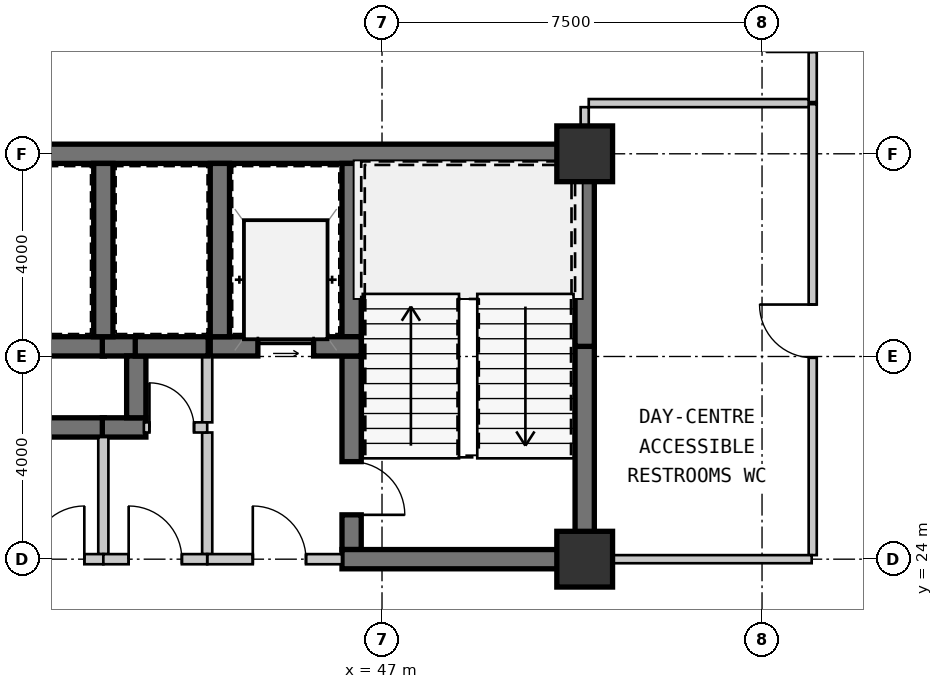
"""IFC4 building model, lengths in metres.
Left out: names, types, materials, properties, quantities, classifications, styles, units other than length and angle.
Written with IfcOpenShell. Run it as: python <this file> out.ifc"""

import sys

from ifc_helpers import new_model, si_unit, direction, frame, frame_2d, origin, origin_2d, place, context, subcontext, project, spatial, rectangle, extrude, source, transform, mapped, element, fill, save


model = new_model("IFC4")
c1 = context("Model", 3, precision=1e-05, world=origin(), true_north=direction((0.0, 1.0)))
c2 = subcontext(c1, "Body", "Model", "MODEL_VIEW")
j1 = project(units=[si_unit("LENGTHUNIT", "METRE"), si_unit("PLANEANGLEUNIT", "RADIAN")], contexts=[c1])
p1 = place(None, origin())
s1 = spatial("IfcSite", under=j1, at=p1, CompositionType="ELEMENT")
p2 = place(p1, origin())
s2 = spatial("IfcBuilding", under=s1, at=p2, CompositionType="ELEMENT")
p3 = place(p2, frame((0.0, 0.0, 12.95)))
s3 = spatial("IfcBuildingStorey", under=s2, at=p3, CompositionType="ELEMENT", Elevation=12.95)
m1 = source(origin(), c2, "Body", "SweptSolid", [
    extrude(rectangle(XDim=1.1, YDim=1.1, at=origin_2d()), origin(), (0.0, 0.0, 1.0), 3.85),
])
for number, where, z_axis, x_axis in (
    (1, (51.0, 24.0, 0.0), (0.0, 0.0, 1.0), (1.0, 0.0, 0.0)),
    (2, (51.0, 32.0, 0.0), (0.0, 0.0, 1.0), (1.0, 0.0, 0.0)),
):
    element("IfcColumn", number, at=place(p3, frame(where, z_axis=z_axis, x_axis=x_axis)), inside=s3, PredefinedType="COLUMN", context=c2, shape_type="MappedRepresentation", body=[
        mapped(m1, transform((0.0, 0.0, 0.0), scale=1.0)),
    ])
m2 = source(origin(), c2, "Body", "SweptSolid", [
    extrude(rectangle(XDim=11.99, YDim=0.38, at=frame_2d((5.995, 0.0))), origin(), (0.0, 0.0, 1.0), 3.43),
])
p4 = place(p3, frame((39.2, 32.0, 0.0), z_axis=(0.0, 0.0, 1.0), x_axis=(1.0, 0.0, 0.0)))
e3 = element("IfcWall", 3, at=p4, inside=s3, PredefinedType="SHEAR", context=c2, shape_type="MappedRepresentation", body=[
    mapped(m2, transform((0.0, 0.0, 0.0), scale=1.0)),
])
m3 = source(origin(), c2, "Body", "SweptSolid", [
    extrude(rectangle(XDim=4.01, YDim=0.38, at=frame_2d((2.005, 0.0))), origin(), (0.0, 0.0, 1.0), 3.43),
])
p5 = place(p3, frame((51.0, 24.19, 0.0), z_axis=(0.0, 0.0, 1.0), x_axis=(0.0, 1.0, 0.0)))
e4 = element("IfcWall", 4, at=p5, inside=s3, PredefinedType="SHEAR", context=c2, shape_type="MappedRepresentation", body=[
    mapped(m3, transform((0.0, 0.0, 0.0), scale=1.0)),
])
m4 = source(origin(), c2, "Body", "SweptSolid", [
    extrude(rectangle(XDim=3.61, YDim=0.38, at=frame_2d((1.805, 0.0))), origin(), (0.0, 0.0, 1.0), 3.43),
])
p6 = place(p3, frame((51.0, 28.2, 0.0), z_axis=(0.0, 0.0, 1.0), x_axis=(0.0, 1.0, 0.0)))
e5 = element("IfcWall", 5, at=p6, inside=s3, PredefinedType="SHEAR", context=c2, shape_type="MappedRepresentation", body=[
    mapped(m4, transform((0.0, 0.0, 0.0), scale=1.0)),
])
m5 = source(origin(), c2, "Body", "SweptSolid", [
    extrude(rectangle(XDim=3.42, YDim=0.38, at=frame_2d((1.71, 0.0))), origin(), (0.0, 0.0, 1.0), 3.43),
])
p7 = place(p3, frame((46.4, 31.81, 0.0), z_axis=(0.0, 0.0, 1.0), x_axis=(0.0, -1.0, 0.0)))
e6 = element("IfcWall", 6, at=p7, inside=s3, PredefinedType="SHEAR", context=c2, shape_type="MappedRepresentation", body=[
    mapped(m5, transform((0.0, 0.0, 0.0), scale=1.0)),
])
m6 = source(origin(), c2, "Body", "SweptSolid", [
    extrude(rectangle(XDim=3.82, YDim=0.38, at=frame_2d((1.91, 0.0))), origin(), (0.0, 0.0, 1.0), 3.43),
])
p8 = place(p3, frame((46.4, 28.01, 0.0), z_axis=(0.0, 0.0, 1.0), x_axis=(0.0, -1.0, 0.0)))
e7 = element("IfcWall", 7, at=p8, inside=s3, PredefinedType="SHEAR", context=c2, shape_type="MappedRepresentation", body=[
    mapped(m6, transform((0.0, 0.0, 0.0), scale=1.0)),
])
m7 = source(origin(), c2, "Body", "SweptSolid", [
    extrude(rectangle(XDim=1.05, YDim=2.1, at=frame_2d((0.525, 1.05))), frame((0.0, 0.2, 0.0), z_axis=(0.0, -1.0, 0.0), x_axis=(1.0, 0.0, 0.0)), (0.0, 0.0, 1.0), 0.4),
])
p9 = place(p8, frame((2.085, 0.0, 0.0)))
e8 = element("IfcOpeningElement", 8, at=p9, cuts=e7, PredefinedType="OPENING", context=c2, shape_type="MappedRepresentation", body=[
    mapped(m7, transform((0.0, 0.0, 0.0), scale=1.0)),
])
m8 = source(origin(), c2, "Body", "SweptSolid", [
    extrude(rectangle(XDim=4.98, YDim=0.38, at=frame_2d((2.49, 0.0))), origin(), (0.0, 0.0, 1.0), 3.43),
])
p10 = place(p3, frame((46.21, 24.0, 0.0), z_axis=(0.0, 0.0, 1.0), x_axis=(1.0, 0.0, 0.0)))
e9 = element("IfcWall", 9, at=p10, inside=s3, PredefinedType="SHEAR", context=c2, shape_type="MappedRepresentation", body=[
    mapped(m8, transform((0.0, 0.0, 0.0), scale=1.0)),
])
m9 = source(origin(), c2, "Body", "SweptSolid", [
    extrude(rectangle(XDim=2.98, YDim=0.38, at=frame_2d((1.49, 0.0))), origin(), (0.0, 0.0, 1.0), 3.43),
])
p11 = place(p3, frame((43.61, 28.2, 0.0), z_axis=(0.0, 0.0, 1.0), x_axis=(1.0, 0.0, 0.0)))
e10 = element("IfcWall", 10, at=p11, inside=s3, PredefinedType="SHEAR", context=c2, shape_type="MappedRepresentation", body=[
    mapped(m9, transform((0.0, 0.0, 0.0), scale=1.0)),
])
m10 = source(origin(), c2, "Body", "SweptSolid", [
    extrude(rectangle(XDim=1.1, YDim=2.15, at=frame_2d((0.55, 1.075))), frame((0.0, 0.2, 0.0), z_axis=(0.0, -1.0, 0.0), x_axis=(1.0, 0.0, 0.0)), (0.0, 0.0, 1.0), 0.4),
])
p12 = place(p11, frame((0.94, 0.0, 0.0)))
e11 = element("IfcOpeningElement", 11, at=p12, cuts=e10, PredefinedType="OPENING", context=c2, shape_type="MappedRepresentation", body=[
    mapped(m10, transform((0.0, 0.0, 0.0), scale=1.0)),
])
p13 = place(p3, frame((43.8, 31.81, 0.0), z_axis=(0.0, 0.0, 1.0), x_axis=(0.0, -1.0, 0.0)))
e12 = element("IfcWall", 12, at=p13, inside=s3, PredefinedType="SHEAR", context=c2, shape_type="MappedRepresentation", body=[
    mapped(m5, transform((0.0, 0.0, 0.0), scale=1.0)),
])
m11 = source(origin(), c2, "Body", "SweptSolid", [
    extrude(rectangle(XDim=2.4, YDim=0.2, at=frame_2d((1.2, 0.0))), origin(), (0.0, 0.0, 1.0), 3.43),
])
p14 = place(p3, frame((43.55, 26.5, 0.0), z_axis=(0.0, 0.0, 1.0), x_axis=(0.0, -1.0, 0.0)))
e13 = element("IfcWall", 13, at=p14, inside=s3, PredefinedType="SOLIDWALL", context=c2, shape_type="MappedRepresentation", body=[
    mapped(m11, transform((0.0, 0.0, 0.0), scale=1.0)),
])
m12 = source(origin(), c2, "Body", "SweptSolid", [
    extrude(rectangle(XDim=1.31, YDim=0.2, at=frame_2d((0.655, 0.0))), origin(), (0.0, 0.0, 1.0), 3.43),
])
p15 = place(p3, frame((43.55, 28.01, 0.0), z_axis=(0.0, 0.0, 1.0), x_axis=(0.0, -1.0, 0.0)))
e14 = element("IfcWall", 14, at=p15, inside=s3, PredefinedType="SOLIDWALL", context=c2, shape_type="MappedRepresentation", body=[
    mapped(m12, transform((0.0, 0.0, 0.0), scale=1.0)),
])
m13 = source(origin(), c2, "Body", "SweptSolid", [
    extrude(rectangle(XDim=2.66, YDim=0.2, at=frame_2d((1.33, 0.0))), origin(), (0.0, 0.0, 1.0), 2.897),
])
p16 = place(p3, frame((43.55, 24.0, 0.0), z_axis=(0.0, 0.0, 1.0), x_axis=(1.0, 0.0, 0.0)))
e15 = element("IfcWall", 15, at=p16, inside=s3, PredefinedType="SOLIDWALL", context=c2, shape_type="MappedRepresentation", body=[
    mapped(m13, transform((0.0, 0.0, 0.0), scale=1.0)),
])
m14 = source(origin(), c2, "Body", "SweptSolid", [
    extrude(rectangle(XDim=1.05, YDim=2.1, at=frame_2d((0.525, 1.05))), frame((0.0, 0.11, 0.0), z_axis=(0.0, -1.0, 0.0), x_axis=(1.0, 0.0, 0.0)), (0.0, 0.0, 1.0), 0.22),
])
p17 = place(p16, frame((0.9, 0.0, 0.0)))
e16 = element("IfcOpeningElement", 16, at=p17, cuts=e15, PredefinedType="OPENING", context=c2, shape_type="MappedRepresentation", body=[
    mapped(m14, transform((0.0, 0.0, 0.0), scale=1.0)),
])
m15 = source(origin(), c2, "Body", "SweptSolid", [
    extrude(rectangle(XDim=1.32, YDim=0.38, at=frame_2d((0.66, 0.0))), origin(), (0.0, 0.0, 1.0), 3.43),
])
p18 = place(p3, frame((41.52, 28.2, 0.0), z_axis=(0.0, 0.0, 1.0), x_axis=(-1.0, 0.0, 0.0)))
e17 = element("IfcWall", 17, at=p18, inside=s3, PredefinedType="SHEAR", context=c2, shape_type="MappedRepresentation", body=[
    mapped(m15, transform((0.0, 0.0, 0.0), scale=1.0)),
])
m16 = source(origin(), c2, "Body", "SweptSolid", [
    extrude(rectangle(XDim=0.67, YDim=0.38, at=frame_2d((0.335, 0.0))), origin(), (0.0, 0.0, 1.0), 3.43),
])
p19 = place(p3, frame((42.15, 28.2, 0.0), z_axis=(0.0, 0.0, 1.0), x_axis=(-1.0, 0.0, 0.0)))
e18 = element("IfcWall", 18, at=p19, inside=s3, PredefinedType="SHEAR", context=c2, shape_type="MappedRepresentation", body=[
    mapped(m16, transform((0.0, 0.0, 0.0), scale=1.0)),
])
m17 = source(origin(), c2, "Body", "SweptSolid", [
    extrude(rectangle(XDim=1.51, YDim=0.38, at=frame_2d((0.755, 0.0))), origin(), (0.0, 0.0, 1.0), 3.43),
])
p20 = place(p3, frame((40.01, 26.6, 0.0), z_axis=(0.0, 0.0, 1.0), x_axis=(1.0, 0.0, 0.0)))
e19 = element("IfcWall", 19, at=p20, inside=s3, PredefinedType="SHEAR", context=c2, shape_type="MappedRepresentation", body=[
    mapped(m17, transform((0.0, 0.0, 0.0), scale=1.0)),
])
m18 = source(origin(), c2, "Body", "SweptSolid", [
    extrude(rectangle(XDim=0.86, YDim=0.38, at=frame_2d((0.43, 0.0))), origin(), (0.0, 0.0, 1.0), 3.43),
])
p21 = place(p3, frame((41.48, 26.6, 0.0), z_axis=(0.0, 0.0, 1.0), x_axis=(1.0, 0.0, 0.0)))
e20 = element("IfcWall", 20, at=p21, inside=s3, PredefinedType="SHEAR", context=c2, shape_type="MappedRepresentation", body=[
    mapped(m18, transform((0.0, 0.0, 0.0), scale=1.0)),
])
m19 = source(origin(), c2, "Body", "SweptSolid", [
    extrude(rectangle(XDim=1.22, YDim=0.38, at=frame_2d((0.61, 0.0))), origin(), (0.0, 0.0, 1.0), 3.43),
])
p22 = place(p3, frame((42.15, 26.79, 0.0), z_axis=(0.0, 0.0, 1.0), x_axis=(0.0, 1.0, 0.0)))
e21 = element("IfcWall", 21, at=p22, inside=s3, PredefinedType="SHEAR", context=c2, shape_type="MappedRepresentation", body=[
    mapped(m19, transform((0.0, 0.0, 0.0), scale=1.0)),
])
p23 = place(p3, frame((41.5, 28.39, 0.0), z_axis=(0.0, 0.0, 1.0), x_axis=(0.0, 1.0, 0.0)))
e22 = element("IfcWall", 22, at=p23, inside=s3, PredefinedType="SHEAR", context=c2, shape_type="MappedRepresentation", body=[
    mapped(m5, transform((0.0, 0.0, 0.0), scale=1.0)),
])
m20 = source(origin(), c2, "Body", "SweptSolid", [
    extrude(rectangle(XDim=1.44, YDim=0.38, at=frame_2d((0.72, 0.0))), origin(), (0.0, 0.0, 1.0), 3.43),
])
p24 = place(p3, frame((42.13, 28.2, 0.0), z_axis=(0.0, 0.0, 1.0), x_axis=(1.0, 0.0, 0.0)))
e23 = element("IfcWall", 23, at=p24, inside=s3, PredefinedType="SHEAR", context=c2, shape_type="MappedRepresentation", body=[
    mapped(m20, transform((0.0, 0.0, 0.0), scale=1.0)),
])
m21 = source(origin(), c2, "Body", "SweptSolid", [
    extrude(rectangle(XDim=2.31, YDim=0.2, at=frame_2d((1.155, 0.0))), origin(), (0.0, 0.0, 1.0), 3.43),
])
p25 = place(p3, frame((41.5, 26.41, 0.0), z_axis=(0.0, 0.0, 1.0), x_axis=(0.0, -1.0, 0.0)))
e24 = element("IfcWall", 24, at=p25, inside=s3, PredefinedType="SOLIDWALL", context=c2, shape_type="MappedRepresentation", body=[
    mapped(m21, transform((0.0, 0.0, 0.0), scale=1.0)),
])
m22 = source(origin(), c2, "Body", "SweptSolid", [
    extrude(rectangle(XDim=2.3, YDim=0.2, at=frame_2d((1.15, 0.0))), origin(), (0.0, 0.0, 1.0), 2.897),
])
p26 = place(p3, frame((41.5, 24.0, 0.0), z_axis=(0.0, 0.0, 1.0), x_axis=(-1.0, 0.0, 0.0)))
e25 = element("IfcWall", 25, at=p26, inside=s3, PredefinedType="SOLIDWALL", context=c2, shape_type="MappedRepresentation", body=[
    mapped(m22, transform((0.0, 0.0, 0.0), scale=1.0)),
])
p27 = place(p26, frame((0.375, 0.0, 0.0)))
e26 = element("IfcOpeningElement", 26, at=p27, cuts=e25, PredefinedType="OPENING", context=c2, shape_type="MappedRepresentation", body=[
    mapped(m14, transform((0.0, 0.0, 0.0), scale=1.0)),
])
m23 = source(origin(), c2, "Body", "SweptSolid", [
    extrude(rectangle(XDim=1.25, YDim=0.2, at=frame_2d((0.625, 0.0))), origin(), (0.0, 0.0, 1.0), 3.43),
])
p28 = place(p3, frame((42.3, 26.6, 0.0), z_axis=(0.0, 0.0, 1.0), x_axis=(1.0, 0.0, 0.0)))
e27 = element("IfcWall", 27, at=p28, inside=s3, PredefinedType="SOLIDWALL", context=c2, shape_type="MappedRepresentation", body=[
    mapped(m23, transform((0.0, 0.0, 0.0), scale=1.0)),
])
m24 = source(origin(), c2, "Body", "SweptSolid", [
    extrude(rectangle(XDim=0.88, YDim=2.1, at=frame_2d((0.44, 1.05))), frame((0.0, 0.11, 0.0), z_axis=(0.0, -1.0, 0.0), x_axis=(1.0, 0.0, 0.0)), (0.0, 0.0, 1.0), 0.22),
])
p29 = place(p28, frame((0.11, 0.0, 0.0)))
e28 = element("IfcOpeningElement", 28, at=p29, cuts=e27, PredefinedType="OPENING", context=c2, shape_type="MappedRepresentation", body=[
    mapped(m24, transform((0.0, 0.0, 0.0), scale=1.0)),
])
m25 = source(origin(), c2, "Body", "SweptSolid", [
    extrude(rectangle(XDim=2.05, YDim=0.2, at=frame_2d((1.025, 0.0))), origin(), (0.0, 0.0, 1.0), 2.897),
])
p30 = place(p3, frame((43.55, 24.0, 0.0), z_axis=(0.0, 0.0, 1.0), x_axis=(-1.0, 0.0, 0.0)))
e29 = element("IfcWall", 29, at=p30, inside=s3, PredefinedType="SOLIDWALL", context=c2, shape_type="MappedRepresentation", body=[
    mapped(m25, transform((0.0, 0.0, 0.0), scale=1.0)),
])
p31 = place(p30, frame((0.5, 0.0, 0.0)))
e30 = element("IfcOpeningElement", 30, at=p31, cuts=e29, PredefinedType="OPENING", context=c2, shape_type="MappedRepresentation", body=[
    mapped(m14, transform((0.0, 0.0, 0.0), scale=1.0)),
])
m26 = source(origin(), c2, "Body", "SweptSolid", [
    extrude(rectangle(XDim=8.9, YDim=0.16, at=frame_2d((4.45, 0.0))), origin(), (0.0, 0.0, 1.0), 3.43),
])
p32 = place(p3, frame((55.5, 24.08, 0.0), z_axis=(0.0, 0.0, 1.0), x_axis=(0.0, 1.0, 0.0)))
e31 = element("IfcWall", 31, at=p32, inside=s3, PredefinedType="PARTITIONING", context=c2, shape_type="MappedRepresentation", body=[
    mapped(m26, transform((0.0, 0.0, 0.0), scale=1.0)),
])
m27 = source(origin(), c2, "Body", "SweptSolid", [
    extrude(rectangle(XDim=1.05, YDim=2.1, at=frame_2d((0.525, 1.05))), frame((0.0, 0.09, 0.0), z_axis=(0.0, -1.0, 0.0), x_axis=(1.0, 0.0, 0.0)), (0.0, 0.0, 1.0), 0.18),
])
p33 = place(p32, frame((3.895, 0.0, 0.0)))
e32 = element("IfcOpeningElement", 32, at=p33, cuts=e31, PredefinedType="OPENING", context=c2, shape_type="MappedRepresentation", body=[
    mapped(m27, transform((0.0, 0.0, 0.0), scale=1.0)),
])
m28 = source(origin(), c2, "Body", "SweptSolid", [
    extrude(rectangle(XDim=4.29, YDim=0.16, at=frame_2d((2.145, 0.0))), origin(), (0.0, 0.0, 1.0), 3.43),
])
p34 = place(p3, frame((51.19, 24.0, 0.0), z_axis=(0.0, 0.0, 1.0), x_axis=(1.0, 0.0, 0.0)))
e33 = element("IfcWall", 33, at=p34, inside=s3, PredefinedType="PARTITIONING", context=c2, shape_type="MappedRepresentation", body=[
    mapped(m28, transform((0.0, 0.0, 0.0), scale=1.0)),
])
m29 = source(origin(), c2, "Body", "SweptSolid", [
    extrude(rectangle(XDim=2.9, YDim=0.16, at=frame_2d((1.45, 0.0))), origin(), (0.0, 0.0, 1.0), 3.43),
])
p35 = place(p3, frame((55.5, 33.02, 0.0), z_axis=(0.0, 0.0, 1.0), x_axis=(0.0, 1.0, 0.0)))
e34 = element("IfcWall", 34, at=p35, inside=s3, PredefinedType="PARTITIONING", context=c2, shape_type="MappedRepresentation", body=[
    mapped(m29, transform((0.0, 0.0, 0.0), scale=1.0)),
])
m30 = source(origin(), c2, "Body", "SweptSolid", [
    extrude(rectangle(XDim=0.92, YDim=2.1, at=frame_2d((0.46, 1.05))), frame((0.0, 0.09, 0.0), z_axis=(0.0, -1.0, 0.0), x_axis=(1.0, 0.0, 0.0)), (0.0, 0.0, 1.0), 0.18),
])
p36 = place(p35, frame((0.99, 0.0, 0.0)))
e35 = element("IfcOpeningElement", 35, at=p36, cuts=e34, PredefinedType="OPENING", context=c2, shape_type="MappedRepresentation", body=[
    mapped(m30, transform((0.0, 0.0, 0.0), scale=1.0)),
])
m31 = source(origin(), c2, "Body", "SweptSolid", [
    extrude(rectangle(XDim=4.34, YDim=0.16, at=frame_2d((2.17, 0.0))), origin(), (0.0, 0.0, 1.0), 3.43),
])
p37 = place(p3, frame((51.08, 33.0, 0.0), z_axis=(0.0, 0.0, 1.0), x_axis=(1.0, 0.0, 0.0)))
e36 = element("IfcWall", 36, at=p37, inside=s3, PredefinedType="PARTITIONING", context=c2, shape_type="MappedRepresentation", body=[
    mapped(m31, transform((0.0, 0.0, 0.0), scale=1.0)),
])
m32 = source(origin(), c2, "Body", "SweptSolid", [
    extrude(rectangle(XDim=0.73, YDim=0.16, at=frame_2d((0.365, 0.0))), origin(), (0.0, 0.0, 1.0), 3.43),
])
p38 = place(p3, frame((51.0, 32.19, 0.0), z_axis=(0.0, 0.0, 1.0), x_axis=(0.0, 1.0, 0.0)))
e37 = element("IfcWall", 37, at=p38, inside=s3, PredefinedType="PARTITIONING", context=c2, shape_type="MappedRepresentation", body=[
    mapped(m32, transform((0.0, 0.0, 0.0), scale=1.0)),
])
m33 = source(origin(), c2, "Body", "SweptSolid", [
    extrude(rectangle(XDim=1.05, YDim=2.1, at=frame_2d((0.525, 1.05))), frame((0.0, 0.025, 0.0), z_axis=(0.0, -1.0, 0.0), x_axis=(1.0, 0.0, 0.0)), (0.0, 0.0, 1.0), 0.05),
])
p39 = place(p9, origin())
e38 = element("IfcDoor", 38, at=p39, inside=s3, OperationType="SINGLE_SWING_RIGHT", PredefinedType="DOOR", context=c2, shape_type="MappedRepresentation", body=[
    mapped(m33, transform((0.0, 0.0, 0.0), scale=1.0)),
])
fill(e8, e38)
m34 = source(origin(), c2, "Body", "SweptSolid", [
    extrude(rectangle(XDim=1.1, YDim=2.15, at=frame_2d((0.55, 1.075))), frame((0.0, 0.025, 0.0), z_axis=(0.0, -1.0, 0.0), x_axis=(1.0, 0.0, 0.0)), (0.0, 0.0, 1.0), 0.05),
])
p40 = place(p12, origin())
e39 = element("IfcDoor", 39, at=p40, inside=s3, OperationType="SLIDING_TO_LEFT", PredefinedType="DOOR", context=c2, shape_type="MappedRepresentation", body=[
    mapped(m34, transform((0.0, 0.0, 0.0), scale=1.0)),
])
fill(e11, e39)
p41 = place(p17, origin())
e40 = element("IfcDoor", 40, at=p41, inside=s3, OperationType="SINGLE_SWING_LEFT", PredefinedType="DOOR", context=c2, shape_type="MappedRepresentation", body=[
    mapped(m33, transform((0.0, 0.0, 0.0), scale=1.0)),
])
fill(e16, e40)
p42 = place(p27, frame((1.05, 0.0, 0.0), z_axis=(0.0, 0.0, 1.0), x_axis=(-1.0, 0.0, 0.0)))
e41 = element("IfcDoor", 41, at=p42, inside=s3, OperationType="SINGLE_SWING_RIGHT", PredefinedType="DOOR", context=c2, shape_type="MappedRepresentation", body=[
    mapped(m33, transform((0.0, 0.0, 0.0), scale=1.0)),
])
fill(e26, e41)
m35 = source(origin(), c2, "Body", "SweptSolid", [
    extrude(rectangle(XDim=0.88, YDim=2.1, at=frame_2d((0.44, 1.05))), frame((0.0, 0.025, 0.0), z_axis=(0.0, -1.0, 0.0), x_axis=(1.0, 0.0, 0.0)), (0.0, 0.0, 1.0), 0.05),
])
p43 = place(p29, origin())
e42 = element("IfcDoor", 42, at=p43, inside=s3, OperationType="SINGLE_SWING_LEFT", PredefinedType="DOOR", context=c2, shape_type="MappedRepresentation", body=[
    mapped(m35, transform((0.0, 0.0, 0.0), scale=1.0)),
])
fill(e28, e42)
p44 = place(p31, frame((1.05, 0.0, 0.0), z_axis=(0.0, 0.0, 1.0), x_axis=(-1.0, 0.0, 0.0)))
e43 = element("IfcDoor", 43, at=p44, inside=s3, OperationType="SINGLE_SWING_LEFT", PredefinedType="DOOR", context=c2, shape_type="MappedRepresentation", body=[
    mapped(m33, transform((0.0, 0.0, 0.0), scale=1.0)),
])
fill(e30, e43)
p45 = place(p33, origin())
e44 = element("IfcDoor", 44, at=p45, inside=s3, OperationType="SINGLE_SWING_RIGHT", PredefinedType="DOOR", context=c2, shape_type="MappedRepresentation", body=[
    mapped(m33, transform((0.0, 0.0, 0.0), scale=1.0)),
])
fill(e32, e44)
save(model, sys.argv[1])
